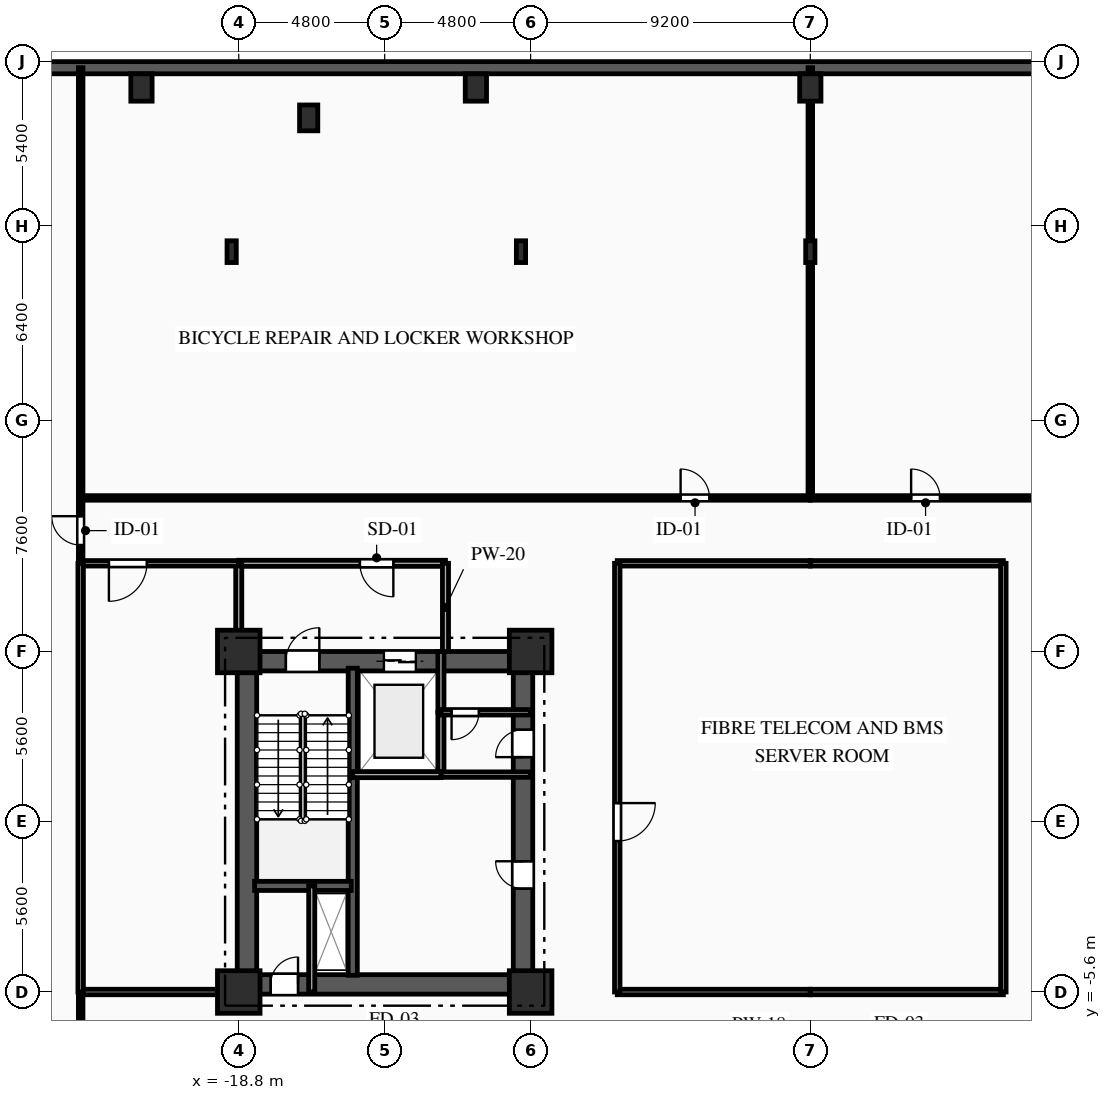
"""IFC4 building model, lengths in metres.
Left out: names, types, materials, properties, quantities, classifications, styles, units other than length and angle.
Written with IfcOpenShell. Run it as: python <this file> out.ifc"""

import sys

from ifc_helpers import new_model, si_unit, direction, frame, frame_2d, origin, origin_2d, place, context, subcontext, project, spatial, rectangle, i_section, extrude, element, fill, save


model = new_model("IFC4")
c1 = context("Model", 3, precision=1e-05, world=origin(), true_north=direction((0.0, 1.0)))
c2 = subcontext(c1, "Body", "Model", "MODEL_VIEW")
j1 = project(units=[si_unit("LENGTHUNIT", "METRE"), si_unit("PLANEANGLEUNIT", "RADIAN")], contexts=[c1])
p1 = place(None, origin())
s1 = spatial("IfcSite", under=j1, at=p1, CompositionType="ELEMENT")
p2 = place(p1, origin())
s2 = spatial("IfcBuilding", under=s1, at=p2, CompositionType="ELEMENT")
p3 = place(p2, frame((0.0, 0.0, -4.5)))
s3 = spatial("IfcBuildingStorey", under=s2, at=p3, CompositionType="ELEMENT", Elevation=-4.5)
for number, where, z_axis, x_axis in (
    (1, (-18.8, -5.6, 0.0), (0.0, 0.0, 1.0), (1.0, 0.0, 0.0)),
    (2, (-18.8, 5.6, 0.0), (0.0, 0.0, 1.0), (1.0, 0.0, 0.0)),
    (3, (-9.2, -5.6, 0.0), (0.0, 0.0, 1.0), (1.0, 0.0, 0.0)),
    (4, (-9.2, 5.6, 0.0), (0.0, 0.0, 1.0), (1.0, 0.0, 0.0)),
):
    element("IfcColumn", number, at=place(p3, frame(where, z_axis=z_axis, x_axis=x_axis)), inside=s3, PredefinedType="COLUMN", context=c2, shape_type="SweptSolid", body=[
        extrude(rectangle(XDim=1.4, YDim=1.4, at=origin_2d()), origin(), (0.0, 0.0, 1.0), 4.5),
    ])
for number, where, z_axis, x_axis in (
    (5, (-22.0, 24.15, 0.0), (0.0, 0.0, 1.0), (1.0, 0.0, 0.0)),
    (6, (-11.0, 24.15, 0.0), (0.0, 0.0, 1.0), (1.0, 0.0, 0.0)),
    (7, (0.0, 24.15, 0.0), (0.0, 0.0, 1.0), (1.0, 0.0, 0.0)),
):
    element("IfcColumn", number, at=place(p3, frame(where, z_axis=z_axis, x_axis=x_axis)), inside=s3, PredefinedType="COLUMN", context=c2, shape_type="SweptSolid", body=[
        extrude(rectangle(XDim=0.7, YDim=0.9, at=origin_2d()), origin(), (0.0, 0.0, 1.0), 4.5),
    ])
p4 = place(p3, frame((-16.5, 23.15, 0.0), z_axis=(0.0, 0.0, 1.0), x_axis=(1.0, 0.0, 0.0)))
e8 = element("IfcColumn", 8, at=p4, inside=s3, PredefinedType="PILASTER", context=c2, shape_type="SweptSolid", body=[
    extrude(rectangle(XDim=0.6, YDim=0.85, at=origin_2d()), origin(), (0.0, 0.0, 1.0), 4.5),
])
for number, where, z_axis, x_axis in (
    (9, (0.0, 18.75, 0.0), (0.0, 0.0, 1.0), (1.0, 0.0, 0.0)),
    (10, (-9.517, 18.75, 0.0), (0.0, 0.0, 1.0), (1.0, 0.0, 0.0)),
    (11, (-19.033, 18.75, 0.0), (0.0, 0.0, 1.0), (1.0, 0.0, 0.0)),
):
    element("IfcColumn", number, at=place(p3, frame(where, z_axis=z_axis, x_axis=x_axis)), inside=s3, PredefinedType="COLUMN", context=c2, shape_type="SweptSolid", body=[
        extrude(i_section(OverallWidth=0.304, OverallDepth=0.716, WebThickness=0.021, FlangeThickness=0.04, FilletRadius=0.027, at=origin_2d()), origin(), (0.0, 0.0, 1.0), 4.5),
    ])
p5 = place(p3, frame((-38.3, 24.8, 0.0), z_axis=(0.0, 0.0, 1.0), x_axis=(1.0, 0.0, 0.0)))
e12 = element("IfcWall", 12, at=p5, inside=s3, PredefinedType="SOLIDWALL", context=c2, shape_type="SweptSolid", body=[
    extrude(rectangle(XDim=76.6, YDim=0.4, at=frame_2d((38.3, 0.0))), origin(), (0.0, 0.0, 1.0), 4.16),
])
p6 = place(p3, frame((-18.8, 5.28, 0.0), z_axis=(0.0, 0.0, 1.0), x_axis=(1.0, 0.0, 0.0)))
e13 = element("IfcWall", 13, at=p6, inside=s3, PredefinedType="SHEAR", context=c2, shape_type="SweptSolid", body=[
    extrude(rectangle(XDim=9.6, YDim=0.64, at=frame_2d((4.8, 0.0))), origin(), (0.0, 0.0, 1.0), 4.16),
])
p7 = place(p6, frame((1.55, 0.0, 0.0)))
e14 = element("IfcOpeningElement", 14, at=p7, cuts=e13, PredefinedType="OPENING", context=c2, shape_type="SweptSolid", body=[
    extrude(rectangle(XDim=1.1, YDim=2.15, at=frame_2d((0.55, 1.075))), frame((0.0, 0.33, 0.0), z_axis=(0.0, -1.0, 0.0), x_axis=(1.0, 0.0, 0.0)), (0.0, 0.0, 1.0), 0.66),
])
p8 = place(p6, frame((4.775, 0.0, 0.0)))
e15 = element("IfcOpeningElement", 15, at=p8, cuts=e13, PredefinedType="OPENING", context=c2, shape_type="SweptSolid", body=[
    extrude(rectangle(XDim=1.05, YDim=2.1, at=frame_2d((0.525, 1.05))), frame((0.0, 0.33, 0.0), z_axis=(0.0, -1.0, 0.0), x_axis=(1.0, 0.0, 0.0)), (0.0, 0.0, 1.0), 0.66),
])
p9 = place(p3, frame((-18.8, -5.35, 0.0), z_axis=(0.0, 0.0, 1.0), x_axis=(1.0, 0.0, 0.0)))
e16 = element("IfcWall", 16, at=p9, inside=s3, PredefinedType="SHEAR", context=c2, shape_type="SweptSolid", body=[
    extrude(rectangle(XDim=9.6, YDim=0.64, at=frame_2d((4.8, 0.0))), origin(), (0.0, 0.0, 1.0), 4.16),
])
p10 = place(p9, frame((1.05, 0.0, 0.0)))
e17 = element("IfcOpeningElement", 17, at=p10, cuts=e16, PredefinedType="OPENING", context=c2, shape_type="SweptSolid", body=[
    extrude(rectangle(XDim=0.9, YDim=2.1, at=frame_2d((0.45, 1.05))), frame((0.0, 0.33, 0.0), z_axis=(0.0, -1.0, 0.0), x_axis=(1.0, 0.0, 0.0)), (0.0, 0.0, 1.0), 0.66),
])
p11 = place(p3, frame((-18.53, -5.05, 0.0), z_axis=(0.0, 0.0, 1.0), x_axis=(0.0, 1.0, 0.0)))
e18 = element("IfcWall", 18, at=p11, inside=s3, PredefinedType="SHEAR", context=c2, shape_type="SweptSolid", body=[
    extrude(rectangle(XDim=10.1, YDim=0.64, at=frame_2d((5.05, 0.0))), origin(), (0.0, 0.0, 1.0), 4.16),
])
p12 = place(p3, frame((-9.45, -5.05, 0.0), z_axis=(0.0, 0.0, 1.0), x_axis=(0.0, 1.0, 0.0)))
e19 = element("IfcWall", 19, at=p12, inside=s3, PredefinedType="SHEAR", context=c2, shape_type="SweptSolid", body=[
    extrude(rectangle(XDim=10.1, YDim=0.64, at=frame_2d((5.05, 0.0))), origin(), (0.0, 0.0, 1.0), 4.16),
])
p13 = place(p12, frame((7.175, 0.0, 0.0)))
e20 = element("IfcOpeningElement", 20, at=p13, cuts=e19, PredefinedType="OPENING", context=c2, shape_type="SweptSolid", body=[
    extrude(rectangle(XDim=0.9, YDim=2.1, at=frame_2d((0.45, 1.05))), frame((0.0, 0.33, 0.0), z_axis=(0.0, -1.0, 0.0), x_axis=(1.0, 0.0, 0.0)), (0.0, 0.0, 1.0), 0.66),
])
p14 = place(p12, frame((2.85, 0.0, 0.0)))
e21 = element("IfcOpeningElement", 21, at=p14, cuts=e19, PredefinedType="OPENING", context=c2, shape_type="SweptSolid", body=[
    extrude(rectangle(XDim=0.9, YDim=2.1, at=frame_2d((0.45, 1.05))), frame((0.0, 0.33, 0.0), z_axis=(0.0, -1.0, 0.0), x_axis=(1.0, 0.0, 0.0)), (0.0, 0.0, 1.0), 0.66),
])
p15 = place(p3, frame((-15.05, -5.05, 0.0), z_axis=(0.0, 0.0, 1.0), x_axis=(0.0, 1.0, 0.0)))
e22 = element("IfcWall", 22, at=p15, inside=s3, PredefinedType="SHEAR", context=c2, shape_type="SweptSolid", body=[
    extrude(rectangle(XDim=10.1, YDim=0.3, at=frame_2d((5.05, 0.0))), origin(), (0.0, 0.0, 1.0), 4.16),
])
p16 = place(p3, frame((-18.28, -2.11, 0.0), z_axis=(0.0, 0.0, 1.0), x_axis=(1.0, 0.0, 0.0)))
e23 = element("IfcWall", 23, at=p16, inside=s3, PredefinedType="SHEAR", context=c2, shape_type="SweptSolid", body=[
    extrude(rectangle(XDim=3.18, YDim=0.3, at=frame_2d((1.59, 0.0))), origin(), (0.0, 0.0, 1.0), 4.16),
])
p17 = place(p3, frame((-16.4, -5.6, 0.0), z_axis=(0.0, 0.0, 1.0), x_axis=(0.0, 1.0, 0.0)))
e24 = element("IfcWall", 24, at=p17, inside=s3, PredefinedType="PARTITIONING", context=c2, shape_type="SweptSolid", body=[
    extrude(rectangle(XDim=3.49, YDim=0.2, at=frame_2d((1.745, 0.0))), origin(), (0.0, 0.0, 1.0), 4.16),
])
p18 = place(p3, frame((-12.15, 1.55, 0.0), z_axis=(0.0, 0.0, 1.0), x_axis=(0.0, 1.0, 0.0)))
e25 = element("IfcWall", 25, at=p18, inside=s3, PredefinedType="PARTITIONING", context=c2, shape_type="SweptSolid", body=[
    extrude(rectangle(XDim=2.05, YDim=0.2, at=frame_2d((1.025, 0.0))), origin(), (0.0, 0.0, 1.0), 4.16),
])
p19 = place(p3, frame((-12.15, 3.6, 0.0), z_axis=(0.0, 0.0, 1.0), x_axis=(0.0, 1.0, 0.0)))
e26 = element("IfcWall", 26, at=p19, inside=s3, PredefinedType="PARTITIONING", context=c2, shape_type="SweptSolid", body=[
    extrude(rectangle(XDim=2.0, YDim=0.2, at=frame_2d((1.0, 0.0))), origin(), (0.0, 0.0, 1.0), 4.16),
])
p20 = place(p3, frame((-12.0, 8.5, 0.0), z_axis=(0.0, 0.0, 1.0), x_axis=(-1.0, 0.0, 0.0)))
e27 = element("IfcWall", 27, at=p20, inside=s3, PredefinedType="PARTITIONING", context=c2, shape_type="SweptSolid", body=[
    extrude(rectangle(XDim=6.8, YDim=0.2, at=frame_2d((3.4, 0.0))), origin(), (0.0, 0.0, 1.0), 4.16),
])
p21 = place(p20, frame((1.715, 0.0, 0.0)))
e28 = element("IfcOpeningElement", 28, at=p21, cuts=e27, PredefinedType="OPENING", context=c2, shape_type="SweptSolid", body=[
    extrude(rectangle(XDim=1.1, YDim=2.15, at=frame_2d((0.55, 1.075))), frame((0.0, 0.11, 0.0), z_axis=(0.0, -1.0, 0.0), x_axis=(1.0, 0.0, 0.0)), (0.0, 0.0, 1.0), 0.22),
])
p22 = place(p3, frame((-12.0, 5.6, 0.0), z_axis=(0.0, 0.0, 1.0), x_axis=(0.0, 1.0, 0.0)))
e29 = element("IfcWall", 29, at=p22, inside=s3, PredefinedType="PARTITIONING", context=c2, shape_type="SweptSolid", body=[
    extrude(rectangle(XDim=2.9, YDim=0.2, at=frame_2d((1.45, 0.0))), origin(), (0.0, 0.0, 1.0), 4.16),
])
p23 = place(p3, frame((-18.8, 8.5, 0.0), z_axis=(0.0, 0.0, 1.0), x_axis=(0.0, -1.0, 0.0)))
e30 = element("IfcWall", 30, at=p23, inside=s3, PredefinedType="PARTITIONING", context=c2, shape_type="SweptSolid", body=[
    extrude(rectangle(XDim=2.9, YDim=0.2, at=frame_2d((1.45, 0.0))), origin(), (0.0, 0.0, 1.0), 3.645),
])
p24 = place(p3, frame((-9.2, 3.6, 0.0), z_axis=(0.0, 0.0, 1.0), x_axis=(-1.0, 0.0, 0.0)))
e31 = element("IfcWall", 31, at=p24, inside=s3, PredefinedType="PARTITIONING", context=c2, shape_type="SweptSolid", body=[
    extrude(rectangle(XDim=2.95, YDim=0.18, at=frame_2d((1.475, 0.0))), origin(), (0.0, 0.0, 1.0), 4.16),
])
p25 = place(p24, frame((1.7, 0.0, 0.0)))
e32 = element("IfcOpeningElement", 32, at=p25, cuts=e31, PredefinedType="OPENING", context=c2, shape_type="SweptSolid", body=[
    extrude(rectangle(XDim=0.9, YDim=2.1, at=frame_2d((0.45, 1.05))), frame((0.0, 0.1, 0.0), z_axis=(0.0, -1.0, 0.0), x_axis=(1.0, 0.0, 0.0)), (0.0, 0.0, 1.0), 0.2),
])
p26 = place(p3, frame((-12.15, 1.55, 0.0), z_axis=(0.0, 0.0, 1.0), x_axis=(1.0, 0.0, 0.0)))
e33 = element("IfcWall", 33, at=p26, inside=s3, PredefinedType="PARTITIONING", context=c2, shape_type="SweptSolid", body=[
    extrude(rectangle(XDim=2.95, YDim=0.18, at=frame_2d((1.475, 0.0))), origin(), (0.0, 0.0, 1.0), 4.16),
])
p27 = place(p3, frame((-24.0, 8.5, 0.0), z_axis=(0.0, 0.0, 1.0), x_axis=(0.0, 1.0, 0.0)))
e34 = element("IfcWall", 34, at=p27, inside=s3, PredefinedType="PARTITIONING", context=c2, shape_type="SweptSolid", body=[
    extrude(rectangle(XDim=2.15, YDim=0.15, at=frame_2d((1.075, 0.0))), origin(), (0.0, 0.0, 1.0), 4.16),
])
p28 = place(p27, frame((0.6, 0.0, 0.0)))
e35 = element("IfcOpeningElement", 35, at=p28, cuts=e34, PredefinedType="OPENING", context=c2, shape_type="SweptSolid", body=[
    extrude(rectangle(XDim=0.95, YDim=2.1, at=frame_2d((0.475, 1.05))), frame((0.0, 0.085, 0.0), z_axis=(0.0, -1.0, 0.0), x_axis=(1.0, 0.0, 0.0)), (0.0, 0.0, 1.0), 0.17),
])
p29 = place(p3, frame((-24.0, 10.65, 0.0), z_axis=(0.0, 0.0, 1.0), x_axis=(1.0, 0.0, 0.0)))
e36 = element("IfcWall", 36, at=p29, inside=s3, PredefinedType="PARTITIONING", context=c2, shape_type="SweptSolid", body=[
    extrude(rectangle(XDim=24.0, YDim=0.15, at=frame_2d((12.0, 0.0))), origin(), (0.0, 0.0, 1.0), 4.16),
])
p30 = place(p29, frame((19.734, 0.0, 0.0)))
e37 = element("IfcOpeningElement", 37, at=p30, cuts=e36, PredefinedType="OPENING", context=c2, shape_type="SweptSolid", body=[
    extrude(rectangle(XDim=0.95, YDim=2.1, at=frame_2d((0.475, 1.05))), frame((0.0, 0.085, 0.0), z_axis=(0.0, -1.0, 0.0), x_axis=(1.0, 0.0, 0.0)), (0.0, 0.0, 1.0), 0.17),
])
p31 = place(p3, frame((-18.8, 8.5, 0.0), z_axis=(0.0, 0.0, 1.0), x_axis=(-1.0, 0.0, 0.0)))
e38 = element("IfcWall", 38, at=p31, inside=s3, PredefinedType="PARTITIONING", context=c2, shape_type="SweptSolid", body=[
    extrude(rectangle(XDim=5.2, YDim=0.18, at=frame_2d((2.6, 0.0))), origin(), (0.0, 0.0, 1.0), 4.16),
])
p32 = place(p31, frame((3.021, 0.0, 0.0)))
e39 = element("IfcOpeningElement", 39, at=p32, cuts=e38, PredefinedType="OPENING", context=c2, shape_type="SweptSolid", body=[
    extrude(rectangle(XDim=1.25, YDim=2.2, at=frame_2d((0.625, 1.1))), frame((0.0, 0.1, 0.0), z_axis=(0.0, -1.0, 0.0), x_axis=(1.0, 0.0, 0.0)), (0.0, 0.0, 1.0), 0.2),
])
p33 = place(p3, frame((0.0, 8.5, 0.0), z_axis=(0.0, 0.0, 1.0), x_axis=(-1.0, 0.0, 0.0)))
e40 = element("IfcWall", 40, at=p33, inside=s3, PredefinedType="PARTITIONING", context=c2, shape_type="SweptSolid", body=[
    extrude(rectangle(XDim=6.35, YDim=0.18, at=frame_2d((3.175, 0.0))), origin(), (0.0, 0.0, 1.0), 4.16),
])
p34 = place(p3, frame((0.0, 10.65, 0.0), z_axis=(0.0, 0.0, 1.0), x_axis=(1.0, 0.0, 0.0)))
e41 = element("IfcWall", 41, at=p34, inside=s3, PredefinedType="PARTITIONING", context=c2, shape_type="SweptSolid", body=[
    extrude(rectangle(XDim=24.0, YDim=0.15, at=frame_2d((12.0, 0.0))), origin(), (0.0, 0.0, 1.0), 4.16),
])
p35 = place(p34, frame((3.316, 0.0, 0.0)))
e42 = element("IfcOpeningElement", 42, at=p35, cuts=e41, PredefinedType="OPENING", context=c2, shape_type="SweptSolid", body=[
    extrude(rectangle(XDim=0.95, YDim=2.1, at=frame_2d((0.475, 1.05))), frame((0.0, 0.085, 0.0), z_axis=(0.0, -1.0, 0.0), x_axis=(1.0, 0.0, 0.0)), (0.0, 0.0, 1.0), 0.17),
])
p36 = place(p3, frame((6.35, 8.5, 0.0), z_axis=(0.0, 0.0, 1.0), x_axis=(-1.0, 0.0, 0.0)))
e43 = element("IfcWall", 43, at=p36, inside=s3, PredefinedType="PARTITIONING", context=c2, shape_type="SweptSolid", body=[
    extrude(rectangle(XDim=6.35, YDim=0.18, at=frame_2d((3.175, 0.0))), origin(), (0.0, 0.0, 1.0), 4.16),
])
p37 = place(p3, frame((-24.0, -7.75, 0.0), z_axis=(0.0, 0.0, 1.0), x_axis=(0.0, 1.0, 0.0)))
e44 = element("IfcWall", 44, at=p37, inside=s3, PredefinedType="PARTITIONING", context=c2, shape_type="SweptSolid", body=[
    extrude(rectangle(XDim=2.15, YDim=0.15, at=frame_2d((1.075, 0.0))), origin(), (0.0, 0.0, 1.0), 4.16),
])
p38 = place(p3, frame((-24.0, -5.6, 0.0), z_axis=(0.0, 0.0, 1.0), x_axis=(1.0, 0.0, 0.0)))
e45 = element("IfcWall", 45, at=p38, inside=s3, PredefinedType="PARTITIONING", context=c2, shape_type="SweptSolid", body=[
    extrude(rectangle(XDim=5.2, YDim=0.18, at=frame_2d((2.6, 0.0))), origin(), (0.0, 0.0, 1.0), 4.16),
])
for number, where, z_axis, x_axis in (
    (46, (-6.35, -5.6, 0.0), (0.0, 0.0, 1.0), (1.0, 0.0, 0.0)),
    (47, (0.0, -5.6, 0.0), (0.0, 0.0, 1.0), (1.0, 0.0, 0.0)),
):
    element("IfcWall", number, at=place(p3, frame(where, z_axis=z_axis, x_axis=x_axis)), inside=s3, PredefinedType="PARTITIONING", context=c2, shape_type="SweptSolid", body=[
        extrude(rectangle(XDim=6.35, YDim=0.18, at=frame_2d((3.175, 0.0))), origin(), (0.0, 0.0, 1.0), 3.331),
    ])
p39 = place(p3, frame((-6.35, 8.5, 0.0), z_axis=(0.0, 0.0, 1.0), x_axis=(0.0, -1.0, 0.0)))
e48 = element("IfcWall", 48, at=p39, inside=s3, PredefinedType="PARTITIONING", context=c2, shape_type="SweptSolid", body=[
    extrude(rectangle(XDim=14.1, YDim=0.18, at=frame_2d((7.05, 0.0))), origin(), (0.0, 0.0, 1.0), 4.16),
])
p40 = place(p39, frame((7.886, 0.0, 0.0)))
e49 = element("IfcOpeningElement", 49, at=p40, cuts=e48, PredefinedType="OPENING", context=c2, shape_type="SweptSolid", body=[
    extrude(rectangle(XDim=1.25, YDim=2.2, at=frame_2d((0.625, 1.1))), frame((0.0, 0.1, 0.0), z_axis=(0.0, -1.0, 0.0), x_axis=(1.0, 0.0, 0.0)), (0.0, 0.0, 1.0), 0.2),
])
p41 = place(p3, frame((6.35, -5.6, 0.0), z_axis=(0.0, 0.0, 1.0), x_axis=(0.0, 1.0, 0.0)))
e50 = element("IfcWall", 50, at=p41, inside=s3, PredefinedType="PARTITIONING", context=c2, shape_type="SweptSolid", body=[
    extrude(rectangle(XDim=14.1, YDim=0.18, at=frame_2d((7.05, 0.0))), origin(), (0.0, 0.0, 1.0), 4.16),
])
p42 = place(p3, frame((-24.0, 24.8, 0.0), z_axis=(0.0, 0.0, 1.0), x_axis=(0.0, -1.0, 0.0)))
e51 = element("IfcWall", 51, at=p42, inside=s3, PredefinedType="PARTITIONING", context=c2, shape_type="SweptSolid", body=[
    extrude(rectangle(XDim=14.15, YDim=0.15, at=frame_2d((7.075, 0.0))), origin(), (0.0, 0.0, 1.0), 4.16),
])
p43 = place(p3, frame((-24.0, 8.5, 0.0), z_axis=(0.0, 0.0, 1.0), x_axis=(0.0, -1.0, 0.0)))
e52 = element("IfcWall", 52, at=p43, inside=s3, PredefinedType="PARTITIONING", context=c2, shape_type="SweptSolid", body=[
    extrude(rectangle(XDim=14.1, YDim=0.18, at=frame_2d((7.05, 0.0))), origin(), (0.0, 0.0, 1.0), 4.16),
])
p44 = place(p3, frame((0.0, 24.8, 0.0), z_axis=(0.0, 0.0, 1.0), x_axis=(0.0, -1.0, 0.0)))
e53 = element("IfcWall", 53, at=p44, inside=s3, PredefinedType="PARTITIONING", context=c2, shape_type="SweptSolid", body=[
    extrude(rectangle(XDim=14.15, YDim=0.15, at=frame_2d((7.075, 0.0))), origin(), (0.0, 0.0, 1.0), 3.545),
])
p45 = place(p3, frame((-15.05, 1.55, 0.0), z_axis=(0.0, 0.0, 1.0), x_axis=(1.0, 0.0, 0.0)))
e54 = element("IfcWall", 54, at=p45, inside=s3, PredefinedType="PARTITIONING", context=c2, shape_type="SweptSolid", body=[
    extrude(rectangle(XDim=2.9, YDim=0.2, at=frame_2d((1.45, 0.0))), origin(), (0.0, 0.0, 1.0), 4.16),
])
p46 = place(p7, origin())
e55 = element("IfcDoor", 55, at=p46, inside=s3, OperationType="SINGLE_SWING_RIGHT", PredefinedType="DOOR", context=c2, shape_type="SweptSolid", body=[
    extrude(rectangle(XDim=1.1, YDim=2.15, at=frame_2d((0.55, 1.075))), frame((0.0, 0.025, 0.0), z_axis=(0.0, -1.0, 0.0), x_axis=(1.0, 0.0, 0.0)), (0.0, 0.0, 1.0), 0.05),
])
fill(e14, e55)
p47 = place(p8, origin())
e56 = element("IfcDoor", 56, at=p47, inside=s3, OperationType="DOUBLE_DOOR_SLIDING", PredefinedType="DOOR", context=c2, shape_type="SweptSolid", body=[
    extrude(rectangle(XDim=1.05, YDim=2.1, at=frame_2d((0.525, 1.05))), frame((0.0, 0.025, 0.0), z_axis=(0.0, -1.0, 0.0), x_axis=(1.0, 0.0, 0.0)), (0.0, 0.0, 1.0), 0.05),
])
fill(e15, e56)
p48 = place(p10, origin())
e57 = element("IfcDoor", 57, at=p48, inside=s3, OperationType="SINGLE_SWING_RIGHT", PredefinedType="DOOR", context=c2, shape_type="SweptSolid", body=[
    extrude(rectangle(XDim=0.9, YDim=2.1, at=frame_2d((0.45, 1.05))), frame((0.0, 0.025, 0.0), z_axis=(0.0, -1.0, 0.0), x_axis=(1.0, 0.0, 0.0)), (0.0, 0.0, 1.0), 0.05),
])
fill(e17, e57)
p49 = place(p21, origin())
e58 = element("IfcDoor", 58, at=p49, inside=s3, OperationType="SINGLE_SWING_LEFT", PredefinedType="DOOR", context=c2, shape_type="SweptSolid", body=[
    extrude(rectangle(XDim=1.1, YDim=2.15, at=frame_2d((0.55, 1.075))), frame((0.0, 0.025, 0.0), z_axis=(0.0, -1.0, 0.0), x_axis=(1.0, 0.0, 0.0)), (0.0, 0.0, 1.0), 0.05),
])
fill(e28, e58)
p50 = place(p25, origin())
e59 = element("IfcDoor", 59, at=p50, inside=s3, OperationType="SINGLE_SWING_RIGHT", PredefinedType="DOOR", context=c2, shape_type="SweptSolid", body=[
    extrude(rectangle(XDim=0.9, YDim=2.1, at=frame_2d((0.45, 1.05))), frame((0.0, 0.025, 0.0), z_axis=(0.0, -1.0, 0.0), x_axis=(1.0, 0.0, 0.0)), (0.0, 0.0, 1.0), 0.05),
])
fill(e32, e59)
p51 = place(p13, origin())
e60 = element("IfcDoor", 60, at=p51, inside=s3, OperationType="SINGLE_SWING_LEFT", PredefinedType="DOOR", context=c2, shape_type="SweptSolid", body=[
    extrude(rectangle(XDim=0.9, YDim=2.1, at=frame_2d((0.45, 1.05))), frame((0.0, 0.025, 0.0), z_axis=(0.0, -1.0, 0.0), x_axis=(1.0, 0.0, 0.0)), (0.0, 0.0, 1.0), 0.05),
])
fill(e20, e60)
p52 = place(p14, origin())
e61 = element("IfcDoor", 61, at=p52, inside=s3, OperationType="SINGLE_SWING_RIGHT", PredefinedType="DOOR", context=c2, shape_type="SweptSolid", body=[
    extrude(rectangle(XDim=0.9, YDim=2.1, at=frame_2d((0.45, 1.05))), frame((0.0, 0.025, 0.0), z_axis=(0.0, -1.0, 0.0), x_axis=(1.0, 0.0, 0.0)), (0.0, 0.0, 1.0), 0.05),
])
fill(e21, e61)
p53 = place(p28, origin())
e62 = element("IfcDoor", 62, at=p53, inside=s3, OperationType="SINGLE_SWING_RIGHT", PredefinedType="DOOR", context=c2, shape_type="SweptSolid", body=[
    extrude(rectangle(XDim=0.95, YDim=2.1, at=frame_2d((0.475, 1.05))), frame((0.0, 0.025, 0.0), z_axis=(0.0, -1.0, 0.0), x_axis=(1.0, 0.0, 0.0)), (0.0, 0.0, 1.0), 0.05),
])
fill(e35, e62)
p54 = place(p30, origin())
e63 = element("IfcDoor", 63, at=p54, inside=s3, OperationType="SINGLE_SWING_LEFT", PredefinedType="DOOR", context=c2, shape_type="SweptSolid", body=[
    extrude(rectangle(XDim=0.95, YDim=2.1, at=frame_2d((0.475, 1.05))), frame((0.0, 0.025, 0.0), z_axis=(0.0, -1.0, 0.0), x_axis=(1.0, 0.0, 0.0)), (0.0, 0.0, 1.0), 0.05),
])
fill(e37, e63)
p55 = place(p32, origin())
e64 = element("IfcDoor", 64, at=p55, inside=s3, OperationType="SINGLE_SWING_RIGHT", PredefinedType="DOOR", context=c2, shape_type="SweptSolid", body=[
    extrude(rectangle(XDim=1.25, YDim=2.2, at=frame_2d((0.625, 1.1))), frame((0.0, 0.025, 0.0), z_axis=(0.0, -1.0, 0.0), x_axis=(1.0, 0.0, 0.0)), (0.0, 0.0, 1.0), 0.05),
])
fill(e39, e64)
p56 = place(p35, origin())
e65 = element("IfcDoor", 65, at=p56, inside=s3, OperationType="SINGLE_SWING_LEFT", PredefinedType="DOOR", context=c2, shape_type="SweptSolid", body=[
    extrude(rectangle(XDim=0.95, YDim=2.1, at=frame_2d((0.475, 1.05))), frame((0.0, 0.025, 0.0), z_axis=(0.0, -1.0, 0.0), x_axis=(1.0, 0.0, 0.0)), (0.0, 0.0, 1.0), 0.05),
])
fill(e42, e65)
p57 = place(p40, origin())
e66 = element("IfcDoor", 66, at=p57, inside=s3, OperationType="SINGLE_SWING_LEFT", PredefinedType="DOOR", context=c2, shape_type="SweptSolid", body=[
    extrude(rectangle(XDim=1.25, YDim=2.2, at=frame_2d((0.625, 1.1))), frame((0.0, 0.025, 0.0), z_axis=(0.0, -1.0, 0.0), x_axis=(1.0, 0.0, 0.0)), (0.0, 0.0, 1.0), 0.05),
])
fill(e49, e66)
save(model, sys.argv[1])
